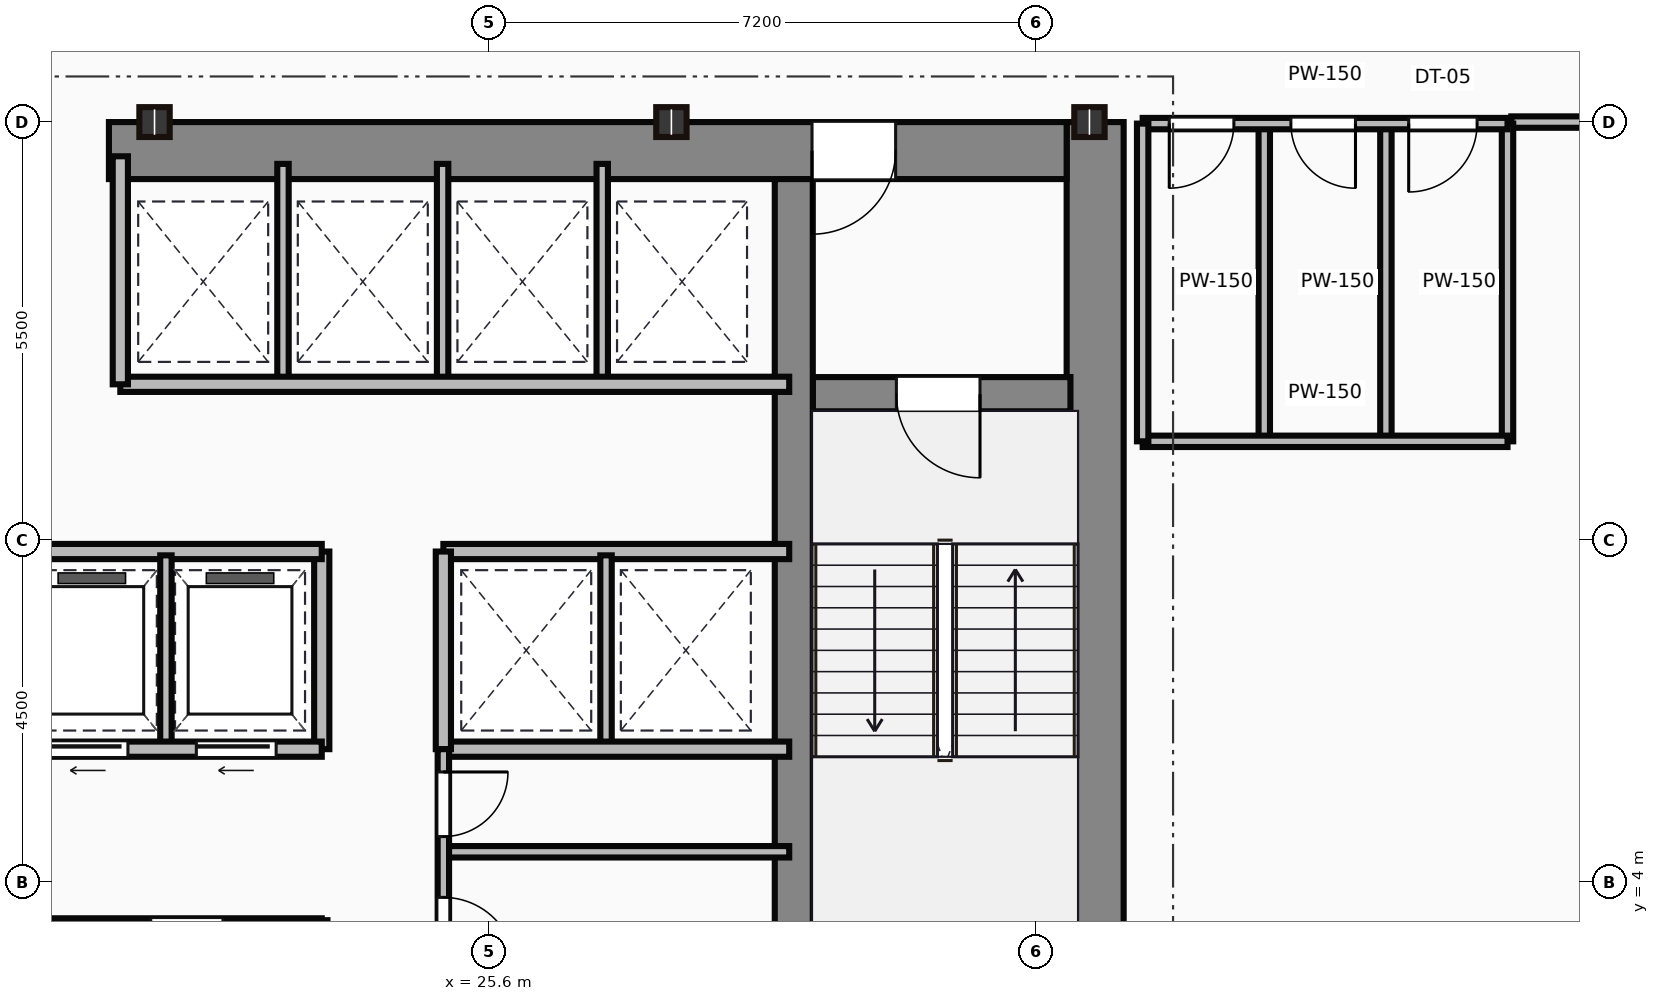
"""IFC4 building model, lengths in metres.
Left out: names, types, materials, properties, quantities, classifications, styles, units other than length and angle.
Written with IfcOpenShell. Run it as: python <this file> out.ifc"""

import sys

from ifc_helpers import new_model, si_unit, direction, frame, frame_2d, origin, origin_2d, place, context, subcontext, project, spatial, rectangle, i_section, extrude, source, transform, mapped, element, fill, save


model = new_model("IFC4")
c1 = context("Model", 3, precision=1e-05, world=origin(), true_north=direction((0.0, 1.0)))
c2 = subcontext(c1, "Body", "Model", "MODEL_VIEW")
j1 = project(units=[si_unit("LENGTHUNIT", "METRE"), si_unit("PLANEANGLEUNIT", "RADIAN")], contexts=[c1])
p1 = place(None, origin())
s1 = spatial("IfcSite", under=j1, at=p1, CompositionType="ELEMENT")
p2 = place(p1, origin())
s2 = spatial("IfcBuilding", under=s1, at=p2, CompositionType="ELEMENT")
p3 = place(p2, frame((0.0, 0.0, 121.5)))
s3 = spatial("IfcBuildingStorey", under=s2, at=p3, CompositionType="ELEMENT", Elevation=121.5)
m1 = source(origin(), c2, "Body", "SweptSolid", [
    extrude(rectangle(XDim=13.1, YDim=0.75, at=frame_2d((6.55, 0.0))), origin(), (0.0, 0.0, 1.0), 3.65),
])
p4 = place(p3, frame((33.575, 0.9, 0.0), z_axis=(0.0, 0.0, 1.0), x_axis=(0.0, 1.0, 0.0)))
e1 = element("IfcWall", 1, at=p4, inside=s3, PredefinedType="SHEAR", context=c2, shape_type="MappedRepresentation", body=[
    mapped(m1, transform((0.0, 0.0, 0.0))),
])
m2 = source(origin(), c2, "Body", "SweptSolid", [
    extrude(rectangle(XDim=12.6, YDim=0.75, at=frame_2d((6.3, 0.0))), origin(), (0.0, 0.0, 1.0), 3.65),
])
p5 = place(p3, frame((20.6, 13.625, 0.0), z_axis=(0.0, 0.0, 1.0), x_axis=(1.0, 0.0, 0.0)))
e2 = element("IfcWall", 2, at=p5, inside=s3, PredefinedType="SHEAR", context=c2, shape_type="MappedRepresentation", body=[
    mapped(m2, transform((0.0, 0.0, 0.0))),
])
p6 = place(p5, frame((9.25, 0.0, 0.0)))
e3 = element("IfcOpeningElement", 3, at=p6, cuts=e2, PredefinedType="OPENING", context=c2, shape_type="SweptSolid", body=[
    extrude(rectangle(XDim=1.1, YDim=2.15, at=frame_2d((0.55, 1.075))), frame((0.0, 0.385, 0.0), z_axis=(0.0, -1.0, 0.0), x_axis=(1.0, 0.0, 0.0)), (0.0, 0.0, 1.0), 0.77),
])
m3 = source(origin(), c2, "Body", "SweptSolid", [
    extrude(rectangle(XDim=12.35, YDim=0.5, at=frame_2d((6.175, 0.0))), origin(), (0.0, 0.0, 1.0), 3.65),
])
p7 = place(p3, frame((29.61, 0.9, 0.0), z_axis=(0.0, 0.0, 1.0), x_axis=(0.0, 1.0, 0.0)))
e4 = element("IfcWall", 4, at=p7, inside=s3, PredefinedType="SHEAR", context=c2, shape_type="MappedRepresentation", body=[
    mapped(m3, transform((0.0, 0.0, 0.0))),
])
m4 = source(origin(), c2, "Body", "SweptSolid", [
    extrude(rectangle(XDim=3.39, YDim=0.45, at=frame_2d((1.695, 0.0))), origin(), (0.0, 0.0, 1.0), 3.65),
])
p8 = place(p3, frame((29.86, 10.42, 0.0), z_axis=(0.0, 0.0, 1.0), x_axis=(1.0, 0.0, 0.0)))
e5 = element("IfcWall", 5, at=p8, inside=s3, PredefinedType="SHEAR", context=c2, shape_type="MappedRepresentation", body=[
    mapped(m4, transform((0.0, 0.0, 0.0))),
])
p9 = place(p8, frame((1.1, 0.0, 0.0)))
e6 = element("IfcOpeningElement", 6, at=p9, cuts=e5, PredefinedType="OPENING", context=c2, shape_type="SweptSolid", body=[
    extrude(rectangle(XDim=1.1, YDim=2.15, at=frame_2d((0.55, 1.075))), frame((0.0, 0.235, 0.0), z_axis=(0.0, -1.0, 0.0), x_axis=(1.0, 0.0, 0.0)), (0.0, 0.0, 1.0), 0.47),
])
m5 = source(origin(), c2, "Body", "SweptSolid", [
    extrude(i_section(OverallWidth=0.399, OverallDepth=0.393, WebThickness=0.023, FlangeThickness=0.037, at=origin_2d()), origin(), (0.0, 0.0, 1.0), 3.65),
])
for number, where, z_axis, x_axis in (
    (7, (21.2, 14.0, 0.0), (0.0, 0.0, 1.0), (1.0, 0.0, 0.0)),
    (8, (28.0, 14.0, 0.0), (0.0, 0.0, 1.0), (1.0, 0.0, 0.0)),
    (9, (33.5, 14.0, 0.0), (0.0, 0.0, 1.0), (1.0, 0.0, 0.0)),
):
    element("IfcColumn", number, at=place(p3, frame(where, z_axis=z_axis, x_axis=x_axis)), inside=s3, PredefinedType="COLUMN", context=c2, shape_type="MappedRepresentation", body=[
        mapped(m5, transform((0.0, 0.0, 0.0))),
    ])
m6 = source(origin(), c2, "Body", "SweptSolid", [
    extrude(rectangle(XDim=10.35, YDim=0.15, at=frame_2d((5.175, 0.0))), origin(), (0.0, 0.0, 1.0), 3.4),
])
p10 = place(p3, frame((13.05, 3.45, 0.0), z_axis=(0.0, 0.0, 1.0), x_axis=(1.0, 0.0, 0.0)))
e10 = element("IfcWall", 10, at=p10, inside=s3, PredefinedType="PARTITIONING", context=c2, shape_type="MappedRepresentation", body=[
    mapped(m6, transform((0.0, 0.0, 0.0))),
])
p11 = place(p10, frame((3.8, 0.0, 0.0)))
e11 = element("IfcOpeningElement", 11, at=p11, cuts=e10, PredefinedType="OPENING", context=c2, shape_type="SweptSolid", body=[
    extrude(rectangle(XDim=0.95, YDim=2.15, at=frame_2d((0.475, 1.075))), frame((0.0, 0.085, 0.0), z_axis=(0.0, -1.0, 0.0), x_axis=(1.0, 0.0, 0.0)), (0.0, 0.0, 1.0), 0.17),
])
p12 = place(p10, frame((8.1, 0.0, 0.0)))
e12 = element("IfcOpeningElement", 12, at=p12, cuts=e10, PredefinedType="OPENING", context=c2, shape_type="SweptSolid", body=[
    extrude(rectangle(XDim=0.95, YDim=2.15, at=frame_2d((0.475, 1.075))), frame((0.0, 0.085, 0.0), z_axis=(0.0, -1.0, 0.0), x_axis=(1.0, 0.0, 0.0)), (0.0, 0.0, 1.0), 0.17),
])
m7 = source(origin(), c2, "Body", "SweptSolid", [
    extrude(rectangle(XDim=2.65, YDim=0.15, at=frame_2d((1.325, 0.0))), origin(), (0.0, 0.0, 1.0), 3.4),
])
p13 = place(p3, frame((23.4, 0.85, 0.0), z_axis=(0.0, 0.0, 1.0), x_axis=(0.0, 1.0, 0.0)))
e13 = element("IfcWall", 13, at=p13, inside=s3, PredefinedType="PARTITIONING", context=c2, shape_type="MappedRepresentation", body=[
    mapped(m7, transform((0.0, 0.0, 0.0))),
])
m8 = source(origin(), c2, "Body", "SweptSolid", [
    extrude(rectangle(XDim=11.85, YDim=0.2, at=frame_2d((5.925, 0.0))), origin(), (0.0, 0.0, 1.0), 3.4),
])
p14 = place(p3, frame((11.55, 5.75, 0.0), z_axis=(0.0, 0.0, 1.0), x_axis=(1.0, 0.0, 0.0)))
e14 = element("IfcWall", 14, at=p14, inside=s3, PredefinedType="PARTITIONING", context=c2, shape_type="MappedRepresentation", body=[
    mapped(m8, transform((0.0, 0.0, 0.0))),
])
p15 = place(p14, frame((0.45, 0.0, 0.0)))
e15 = element("IfcOpeningElement", 15, at=p15, cuts=e14, PredefinedType="OPENING", context=c2, shape_type="SweptSolid", body=[
    extrude(rectangle(XDim=1.05, YDim=2.15, at=frame_2d((0.525, 1.075))), frame((0.0, 0.11, 0.0), z_axis=(0.0, -1.0, 0.0), x_axis=(1.0, 0.0, 0.0)), (0.0, 0.0, 1.0), 0.22),
])
p16 = place(p14, frame((2.4, 0.0, 0.0)))
e16 = element("IfcOpeningElement", 16, at=p16, cuts=e14, PredefinedType="OPENING", context=c2, shape_type="SweptSolid", body=[
    extrude(rectangle(XDim=1.05, YDim=2.15, at=frame_2d((0.525, 1.075))), frame((0.0, 0.11, 0.0), z_axis=(0.0, -1.0, 0.0), x_axis=(1.0, 0.0, 0.0)), (0.0, 0.0, 1.0), 0.22),
])
p17 = place(p14, frame((4.35, 0.0, 0.0)))
e17 = element("IfcOpeningElement", 17, at=p17, cuts=e14, PredefinedType="OPENING", context=c2, shape_type="SweptSolid", body=[
    extrude(rectangle(XDim=1.05, YDim=2.15, at=frame_2d((0.525, 1.075))), frame((0.0, 0.11, 0.0), z_axis=(0.0, -1.0, 0.0), x_axis=(1.0, 0.0, 0.0)), (0.0, 0.0, 1.0), 0.22),
])
p18 = place(p14, frame((6.3, 0.0, 0.0)))
e18 = element("IfcOpeningElement", 18, at=p18, cuts=e14, PredefinedType="OPENING", context=c2, shape_type="SweptSolid", body=[
    extrude(rectangle(XDim=1.05, YDim=2.15, at=frame_2d((0.525, 1.075))), frame((0.0, 0.11, 0.0), z_axis=(0.0, -1.0, 0.0), x_axis=(1.0, 0.0, 0.0)), (0.0, 0.0, 1.0), 0.22),
])
p19 = place(p14, frame((8.25, 0.0, 0.0)))
e19 = element("IfcOpeningElement", 19, at=p19, cuts=e14, PredefinedType="OPENING", context=c2, shape_type="SweptSolid", body=[
    extrude(rectangle(XDim=1.05, YDim=2.15, at=frame_2d((0.525, 1.075))), frame((0.0, 0.11, 0.0), z_axis=(0.0, -1.0, 0.0), x_axis=(1.0, 0.0, 0.0)), (0.0, 0.0, 1.0), 0.22),
])
p20 = place(p14, frame((10.2, 0.0, 0.0)))
e20 = element("IfcOpeningElement", 20, at=p20, cuts=e14, PredefinedType="OPENING", context=c2, shape_type="SweptSolid", body=[
    extrude(rectangle(XDim=1.05, YDim=2.15, at=frame_2d((0.525, 1.075))), frame((0.0, 0.11, 0.0), z_axis=(0.0, -1.0, 0.0), x_axis=(1.0, 0.0, 0.0)), (0.0, 0.0, 1.0), 0.22),
])
p21 = place(p3, frame((11.55, 8.35, 0.0), z_axis=(0.0, 0.0, 1.0), x_axis=(1.0, 0.0, 0.0)))
e21 = element("IfcWall", 21, at=p21, inside=s3, PredefinedType="PARTITIONING", context=c2, shape_type="MappedRepresentation", body=[
    mapped(m8, transform((0.0, 0.0, 0.0))),
])
m9 = source(origin(), c2, "Body", "SweptSolid", [
    extrude(rectangle(XDim=2.6, YDim=0.2, at=frame_2d((1.3, 0.0))), origin(), (0.0, 0.0, 1.0), 3.4),
])
p22 = place(p3, frame((23.4, 5.75, 0.0), z_axis=(0.0, 0.0, 1.0), x_axis=(0.0, 1.0, 0.0)))
e22 = element("IfcWall", 22, at=p22, inside=s3, PredefinedType="PARTITIONING", context=c2, shape_type="MappedRepresentation", body=[
    mapped(m9, transform((0.0, 0.0, 0.0))),
])
m10 = source(origin(), c2, "Body", "SweptSolid", [
    extrude(rectangle(XDim=2.5, YDim=0.15, at=frame_2d((1.25, 0.0))), origin(), (0.0, 0.0, 1.0), 3.4),
])
p23 = place(p3, frame((21.35, 5.8, 0.0), z_axis=(0.0, 0.0, 1.0), x_axis=(0.0, 1.0, 0.0)))
e23 = element("IfcWall", 23, at=p23, inside=s3, PredefinedType="PARTITIONING", context=c2, shape_type="MappedRepresentation", body=[
    mapped(m10, transform((0.0, 0.0, 0.0))),
])
m11 = source(origin(), c2, "Body", "SweptSolid", [
    extrude(rectangle(XDim=8.8, YDim=0.2, at=frame_2d((4.4, 0.0))), origin(), (0.0, 0.0, 1.0), 3.4),
])
p24 = place(p3, frame((20.75, 10.55, 0.0), z_axis=(0.0, 0.0, 1.0), x_axis=(1.0, 0.0, 0.0)))
e24 = element("IfcWall", 24, at=p24, inside=s3, PredefinedType="PARTITIONING", context=c2, shape_type="MappedRepresentation", body=[
    mapped(m11, transform((0.0, 0.0, 0.0))),
])
m12 = source(origin(), c2, "Body", "SweptSolid", [
    extrude(rectangle(XDim=3.0, YDim=0.2, at=frame_2d((1.5, 0.0))), origin(), (0.0, 0.0, 1.0), 3.4),
])
p25 = place(p3, frame((20.75, 10.55, 0.0), z_axis=(0.0, 0.0, 1.0), x_axis=(0.0, 1.0, 0.0)))
e25 = element("IfcWall", 25, at=p25, inside=s3, PredefinedType="PARTITIONING", context=c2, shape_type="MappedRepresentation", body=[
    mapped(m12, transform((0.0, 0.0, 0.0))),
])
m13 = source(origin(), c2, "Body", "SweptSolid", [
    extrude(rectangle(XDim=2.85, YDim=0.15, at=frame_2d((1.425, 0.0))), origin(), (0.0, 0.0, 1.0), 3.4),
])
for number, where, z_axis, x_axis in (
    (26, (22.89, 10.6, 0.0), (0.0, 0.0, 1.0), (0.0, 1.0, 0.0)),
    (27, (24.99, 10.6, 0.0), (0.0, 0.0, 1.0), (0.0, 1.0, 0.0)),
    (28, (27.09, 10.6, 0.0), (0.0, 0.0, 1.0), (0.0, 1.0, 0.0)),
):
    element("IfcWall", number, at=place(p3, frame(where, z_axis=z_axis, x_axis=x_axis)), inside=s3, PredefinedType="PARTITIONING", context=c2, shape_type="MappedRepresentation", body=[
        mapped(m13, transform((0.0, 0.0, 0.0))),
    ])
m14 = source(origin(), c2, "Body", "SweptSolid", [
    extrude(rectangle(XDim=4.55, YDim=0.2, at=frame_2d((2.275, 0.0))), origin(), (0.0, 0.0, 1.0), 3.4),
])
for number, where, z_axis, x_axis in (
    (29, (25.0, 8.35, 0.0), (0.0, 0.0, 1.0), (1.0, 0.0, 0.0)),
    (30, (25.0, 5.75, 0.0), (0.0, 0.0, 1.0), (1.0, 0.0, 0.0)),
):
    element("IfcWall", number, at=place(p3, frame(where, z_axis=z_axis, x_axis=x_axis)), inside=s3, PredefinedType="PARTITIONING", context=c2, shape_type="MappedRepresentation", body=[
        mapped(m14, transform((0.0, 0.0, 0.0))),
    ])
p26 = place(p3, frame((25.0, 5.75, 0.0), z_axis=(0.0, 0.0, 1.0), x_axis=(0.0, 1.0, 0.0)))
e31 = element("IfcWall", 31, at=p26, inside=s3, PredefinedType="PARTITIONING", context=c2, shape_type="MappedRepresentation", body=[
    mapped(m9, transform((0.0, 0.0, 0.0))),
])
p27 = place(p3, frame((27.14, 5.8, 0.0), z_axis=(0.0, 0.0, 1.0), x_axis=(0.0, 1.0, 0.0)))
e32 = element("IfcWall", 32, at=p27, inside=s3, PredefinedType="PARTITIONING", context=c2, shape_type="MappedRepresentation", body=[
    mapped(m10, transform((0.0, 0.0, 0.0))),
])
m15 = source(origin(), c2, "Body", "SweptSolid", [
    extrude(rectangle(XDim=4.9, YDim=0.15, at=frame_2d((2.45, 0.0))), origin(), (0.0, 0.0, 1.0), 3.4),
])
p28 = place(p3, frame((25.0, 0.85, 0.0), z_axis=(0.0, 0.0, 1.0), x_axis=(0.0, 1.0, 0.0)))
e33 = element("IfcWall", 33, at=p28, inside=s3, PredefinedType="PARTITIONING", context=c2, shape_type="MappedRepresentation", body=[
    mapped(m15, transform((0.0, 0.0, 0.0))),
])
p29 = place(p28, frame((2.0, 0.0, 0.0)))
e34 = element("IfcOpeningElement", 34, at=p29, cuts=e33, PredefinedType="OPENING", context=c2, shape_type="SweptSolid", body=[
    extrude(rectangle(XDim=0.95, YDim=2.15, at=frame_2d((0.475, 1.075))), frame((0.0, 0.085, 0.0), z_axis=(0.0, -1.0, 0.0), x_axis=(1.0, 0.0, 0.0)), (0.0, 0.0, 1.0), 0.17),
])
p30 = place(p28, frame((3.75, 0.0, 0.0)))
e35 = element("IfcOpeningElement", 35, at=p30, cuts=e33, PredefinedType="OPENING", context=c2, shape_type="SweptSolid", body=[
    extrude(rectangle(XDim=0.85, YDim=2.15, at=frame_2d((0.425, 1.075))), frame((0.0, 0.085, 0.0), z_axis=(0.0, -1.0, 0.0), x_axis=(1.0, 0.0, 0.0)), (0.0, 0.0, 1.0), 0.17),
])
m16 = source(origin(), c2, "Body", "SweptSolid", [
    extrude(rectangle(XDim=4.55, YDim=0.15, at=frame_2d((2.275, 0.0))), origin(), (0.0, 0.0, 1.0), 3.4),
])
p31 = place(p3, frame((25.0, 4.4, 0.0), z_axis=(0.0, 0.0, 1.0), x_axis=(1.0, 0.0, 0.0)))
e36 = element("IfcWall", 36, at=p31, inside=s3, PredefinedType="PARTITIONING", context=c2, shape_type="MappedRepresentation", body=[
    mapped(m16, transform((0.0, 0.0, 0.0))),
])
m17 = source(origin(), c2, "Body", "SweptSolid", [
    extrude(rectangle(XDim=4.8, YDim=0.15, at=frame_2d((2.4, 0.0))), origin(), (0.0, 0.0, 1.0), 2.702),
])
p32 = place(p3, frame((34.2, 13.98, 0.0), z_axis=(0.0, 0.0, 1.0), x_axis=(1.0, 0.0, 0.0)))
e37 = element("IfcWall", 37, at=p32, inside=s3, PredefinedType="PARTITIONING", context=c2, shape_type="MappedRepresentation", body=[
    mapped(m17, transform((0.0, 0.0, 0.0))),
])
p33 = place(p32, frame((0.35, 0.0, 0.0)))
e38 = element("IfcOpeningElement", 38, at=p33, cuts=e37, PredefinedType="OPENING", context=c2, shape_type="SweptSolid", body=[
    extrude(rectangle(XDim=0.85, YDim=2.1, at=frame_2d((0.425, 1.05))), frame((0.0, 0.085, 0.0), z_axis=(0.0, -1.0, 0.0), x_axis=(1.0, 0.0, 0.0)), (0.0, 0.0, 1.0), 0.17),
])
p34 = place(p32, frame((1.95, 0.0, 0.0)))
e39 = element("IfcOpeningElement", 39, at=p34, cuts=e37, PredefinedType="OPENING", context=c2, shape_type="SweptSolid", body=[
    extrude(rectangle(XDim=0.85, YDim=2.1, at=frame_2d((0.425, 1.05))), frame((0.0, 0.085, 0.0), z_axis=(0.0, -1.0, 0.0), x_axis=(1.0, 0.0, 0.0)), (0.0, 0.0, 1.0), 0.17),
])
p35 = place(p32, frame((3.5, 0.0, 0.0)))
e40 = element("IfcOpeningElement", 40, at=p35, cuts=e37, PredefinedType="OPENING", context=c2, shape_type="SweptSolid", body=[
    extrude(rectangle(XDim=0.9, YDim=2.1, at=frame_2d((0.45, 1.05))), frame((0.0, 0.085, 0.0), z_axis=(0.0, -1.0, 0.0), x_axis=(1.0, 0.0, 0.0)), (0.0, 0.0, 1.0), 0.17),
])
m18 = source(origin(), c2, "Body", "SweptSolid", [
    extrude(rectangle(XDim=4.8, YDim=0.15, at=frame_2d((2.4, 0.0))), origin(), (0.0, 0.0, 1.0), 3.4),
])
p36 = place(p3, frame((34.2, 9.8, 0.0), z_axis=(0.0, 0.0, 1.0), x_axis=(1.0, 0.0, 0.0)))
e41 = element("IfcWall", 41, at=p36, inside=s3, PredefinedType="PARTITIONING", context=c2, shape_type="MappedRepresentation", body=[
    mapped(m18, transform((0.0, 0.0, 0.0))),
])
m19 = source(origin(), c2, "Body", "SweptSolid", [
    extrude(rectangle(XDim=4.18, YDim=0.15, at=frame_2d((2.09, 0.0))), origin(), (0.0, 0.0, 1.0), 3.4),
])
for number, where, z_axis, x_axis in (
    (42, (39.0, 9.8, 0.0), (0.0, 0.0, 1.0), (0.0, 1.0, 0.0)),
    (43, (34.2, 9.8, 0.0), (0.0, 0.0, 1.0), (0.0, 1.0, 0.0)),
    (44, (35.8, 9.8, 0.0), (0.0, 0.0, 1.0), (0.0, 1.0, 0.0)),
    (45, (37.4, 9.8, 0.0), (0.0, 0.0, 1.0), (0.0, 1.0, 0.0)),
):
    element("IfcWall", number, at=place(p3, frame(where, z_axis=z_axis, x_axis=x_axis)), inside=s3, PredefinedType="PARTITIONING", context=c2, shape_type="MappedRepresentation", body=[
        mapped(m19, transform((0.0, 0.0, 0.0))),
    ])
m20 = source(origin(), c2, "Body", "SweptSolid", [
    extrude(rectangle(XDim=1.75, YDim=0.15, at=frame_2d((0.875, 0.0))), origin(), (0.0, 0.0, 1.0), 2.702),
])
p37 = place(p3, frame((40.8, 14.0, 0.0), z_axis=(0.0, 0.0, 1.0), x_axis=(-1.0, 0.0, 0.0)))
e46 = element("IfcWall", 46, at=p37, inside=s3, PredefinedType="PARTITIONING", context=c2, shape_type="MappedRepresentation", body=[
    mapped(m20, transform((0.0, 0.0, 0.0))),
])
m21 = source(origin(), c2, "Body", "SweptSolid", [
    extrude(rectangle(XDim=1.1, YDim=2.15, at=frame_2d((0.55, 1.075))), frame((0.0, 0.025, 0.0), z_axis=(0.0, -1.0, 0.0), x_axis=(1.0, 0.0, 0.0)), (0.0, 0.0, 1.0), 0.05),
])
p38 = place(p9, frame((1.1, 0.0, 0.0), z_axis=(0.0, 0.0, 1.0), x_axis=(-1.0, 0.0, 0.0)))
e47 = element("IfcDoor", 47, at=p38, inside=s3, OperationType="SINGLE_SWING_RIGHT", PredefinedType="DOOR", context=c2, shape_type="MappedRepresentation", body=[
    mapped(m21, transform((0.0, 0.0, 0.0))),
])
fill(e6, e47)
p39 = place(p6, origin())
e48 = element("IfcDoor", 48, at=p39, inside=s3, OperationType="SINGLE_SWING_LEFT", PredefinedType="DOOR", context=c2, shape_type="MappedRepresentation", body=[
    mapped(m21, transform((0.0, 0.0, 0.0))),
])
fill(e3, e48)
m22 = source(origin(), c2, "Body", "SweptSolid", [
    extrude(rectangle(XDim=1.05, YDim=2.15, at=frame_2d((0.525, 1.075))), frame((0.0, 0.025, 0.0), z_axis=(0.0, -1.0, 0.0), x_axis=(1.0, 0.0, 0.0)), (0.0, 0.0, 1.0), 0.05),
])
p40 = place(p19, frame((1.05, 0.0, 0.0), z_axis=(0.0, 0.0, 1.0), x_axis=(-1.0, 0.0, 0.0)))
e49 = element("IfcDoor", 49, at=p40, inside=s3, OperationType="SLIDING_TO_LEFT", PredefinedType="DOOR", context=c2, shape_type="MappedRepresentation", body=[
    mapped(m22, transform((0.0, 0.0, 0.0))),
])
fill(e19, e49)
p41 = place(p20, frame((1.05, 0.0, 0.0), z_axis=(0.0, 0.0, 1.0), x_axis=(-1.0, 0.0, 0.0)))
e50 = element("IfcDoor", 50, at=p41, inside=s3, OperationType="SLIDING_TO_LEFT", PredefinedType="DOOR", context=c2, shape_type="MappedRepresentation", body=[
    mapped(m22, transform((0.0, 0.0, 0.0))),
])
fill(e20, e50)
m23 = source(origin(), c2, "Body", "SweptSolid", [
    extrude(rectangle(XDim=0.95, YDim=2.15, at=frame_2d((0.475, 1.075))), frame((0.0, 0.025, 0.0), z_axis=(0.0, -1.0, 0.0), x_axis=(1.0, 0.0, 0.0)), (0.0, 0.0, 1.0), 0.05),
])
p42 = place(p29, origin())
e51 = element("IfcDoor", 51, at=p42, inside=s3, OperationType="SINGLE_SWING_LEFT", PredefinedType="DOOR", context=c2, shape_type="MappedRepresentation", body=[
    mapped(m23, transform((0.0, 0.0, 0.0))),
])
fill(e34, e51)
m24 = source(origin(), c2, "Body", "SweptSolid", [
    extrude(rectangle(XDim=0.85, YDim=2.15, at=frame_2d((0.425, 1.075))), frame((0.0, 0.025, 0.0), z_axis=(0.0, -1.0, 0.0), x_axis=(1.0, 0.0, 0.0)), (0.0, 0.0, 1.0), 0.05),
])
p43 = place(p30, origin())
e52 = element("IfcDoor", 52, at=p43, inside=s3, OperationType="SINGLE_SWING_RIGHT", PredefinedType="DOOR", context=c2, shape_type="MappedRepresentation", body=[
    mapped(m24, transform((0.0, 0.0, 0.0))),
])
fill(e35, e52)
m25 = source(origin(), c2, "Body", "SweptSolid", [
    extrude(rectangle(XDim=0.85, YDim=2.1, at=frame_2d((0.425, 1.05))), frame((0.0, 0.025, 0.0), z_axis=(0.0, -1.0, 0.0), x_axis=(1.0, 0.0, 0.0)), (0.0, 0.0, 1.0), 0.05),
])
p44 = place(p33, frame((0.85, 0.0, 0.0), z_axis=(0.0, 0.0, 1.0), x_axis=(-1.0, 0.0, 0.0)))
e53 = element("IfcDoor", 53, at=p44, inside=s3, OperationType="SINGLE_SWING_LEFT", PredefinedType="DOOR", context=c2, shape_type="MappedRepresentation", body=[
    mapped(m25, transform((0.0, 0.0, 0.0))),
])
fill(e38, e53)
p45 = place(p34, frame((0.85, 0.0, 0.0), z_axis=(0.0, 0.0, 1.0), x_axis=(-1.0, 0.0, 0.0)))
e54 = element("IfcDoor", 54, at=p45, inside=s3, OperationType="SINGLE_SWING_RIGHT", PredefinedType="DOOR", context=c2, shape_type="MappedRepresentation", body=[
    mapped(m25, transform((0.0, 0.0, 0.0))),
])
fill(e39, e54)
m26 = source(origin(), c2, "Body", "SweptSolid", [
    extrude(rectangle(XDim=0.9, YDim=2.1, at=frame_2d((0.45, 1.05))), frame((0.0, 0.025, 0.0), z_axis=(0.0, -1.0, 0.0), x_axis=(1.0, 0.0, 0.0)), (0.0, 0.0, 1.0), 0.05),
])
p46 = place(p35, frame((0.9, 0.0, 0.0), z_axis=(0.0, 0.0, 1.0), x_axis=(-1.0, 0.0, 0.0)))
e55 = element("IfcDoor", 55, at=p46, inside=s3, OperationType="SINGLE_SWING_LEFT", PredefinedType="DOOR", context=c2, shape_type="MappedRepresentation", body=[
    mapped(m26, transform((0.0, 0.0, 0.0))),
])
fill(e40, e55)
save(model, sys.argv[1])
